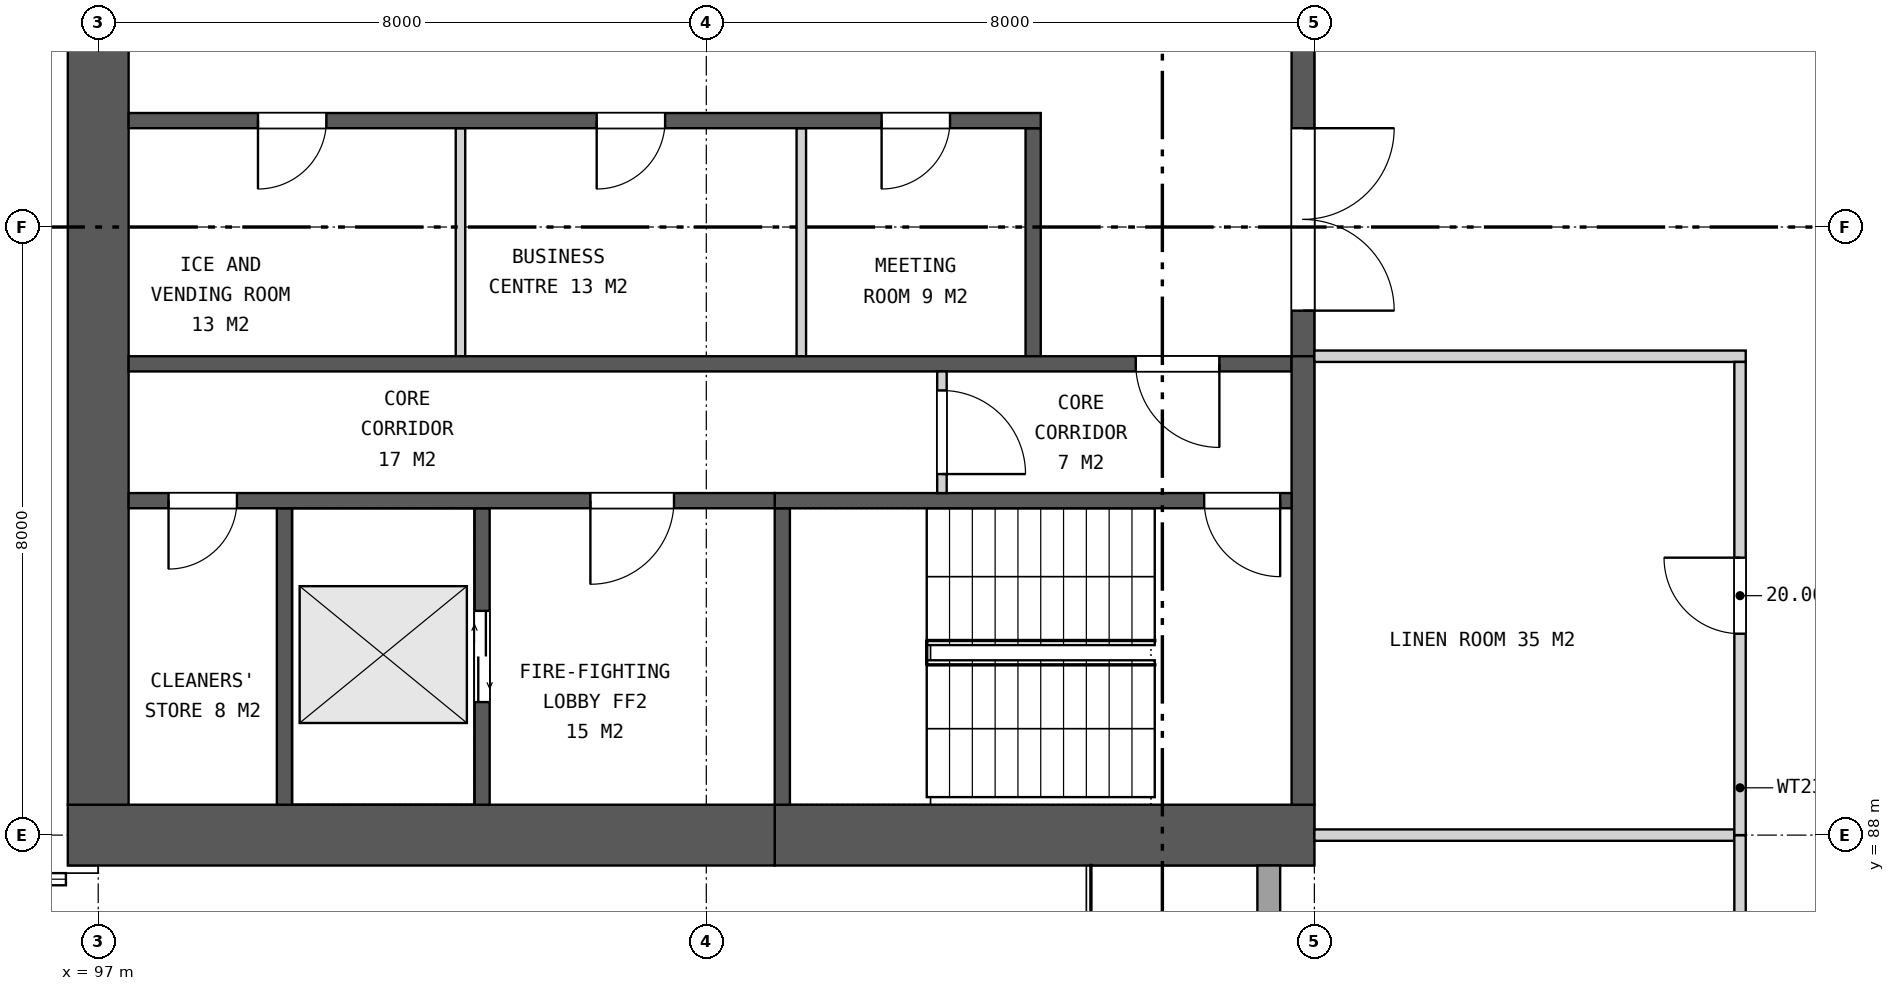
"""IFC4 building model, lengths in metres.
Left out: names, types, materials, properties, quantities, classifications, styles, units other than length and angle.
Written with IfcOpenShell. Run it as: python <this file> out.ifc"""

import sys

from ifc_helpers import new_model, si_unit, direction, frame, frame_2d, origin, place, context, subcontext, project, spatial, rectangle, extrude, element, fill, save


model = new_model("IFC4")
c1 = context("Model", 3, precision=1e-05, world=origin(), true_north=direction((0.0, 1.0)))
c2 = subcontext(c1, "Body", "Model", "MODEL_VIEW")
j1 = project(units=[si_unit("LENGTHUNIT", "METRE"), si_unit("PLANEANGLEUNIT", "RADIAN")], contexts=[c1])
p1 = place(None, origin())
s1 = spatial("IfcSite", under=j1, at=p1, CompositionType="ELEMENT")
p2 = place(p1, origin())
s2 = spatial("IfcBuilding", under=s1, at=p2, CompositionType="ELEMENT")
p3 = place(p2, frame((0.0, 0.0, 101.6)))
s3 = spatial("IfcBuildingStorey", under=s2, at=p3, CompositionType="ELEMENT", Elevation=101.6)
p4 = place(p3, frame((113.0, 88.0, 0.0), z_axis=(0.0, 0.0, 1.0), x_axis=(-1.0, 0.0, 0.0)))
e1 = element("IfcWall", 1, at=p4, inside=s3, PredefinedType="SHEAR", context=c2, shape_type="SweptSolid", body=[
    extrude(rectangle(XDim=7.1, YDim=0.8, at=frame_2d((3.55, 0.0))), origin(), (0.0, 0.0, 1.0), 3.7),
])
p5 = place(p3, frame((105.9, 88.0, 0.0), z_axis=(0.0, 0.0, 1.0), x_axis=(-1.0, 0.0, 0.0)))
e2 = element("IfcWall", 2, at=p5, inside=s3, PredefinedType="SHEAR", context=c2, shape_type="SweptSolid", body=[
    extrude(rectangle(XDim=9.3, YDim=0.8, at=frame_2d((4.65, 0.0))), origin(), (0.0, 0.0, 1.0), 3.7),
])
p6 = place(p3, frame((97.0, 111.6, 0.0), z_axis=(0.0, 0.0, 1.0), x_axis=(0.0, -1.0, 0.0)))
e3 = element("IfcWall", 3, at=p6, inside=s3, PredefinedType="SHEAR", context=c2, shape_type="SweptSolid", body=[
    extrude(rectangle(XDim=23.2, YDim=0.8, at=frame_2d((11.6, 0.0))), origin(), (0.0, 0.0, 1.0), 3.7),
])
p7 = place(p6, frame((10.4, 0.0, 0.0)))
e4 = element("IfcOpeningElement", 4, at=p7, cuts=e3, PredefinedType="OPENING", context=c2, shape_type="SweptSolid", body=[
    extrude(rectangle(XDim=2.4, YDim=2.4, at=frame_2d((1.2, 1.2))), frame((0.0, 0.41, 0.0), z_axis=(0.0, -1.0, 0.0), x_axis=(1.0, 0.0, 0.0)), (0.0, 0.0, 1.0), 0.82),
])
p8 = place(p3, frame((112.85, 105.7, 0.0), z_axis=(0.0, 0.0, 1.0), x_axis=(0.0, -1.0, 0.0)))
e5 = element("IfcWall", 5, at=p8, inside=s3, PredefinedType="SHEAR", context=c2, shape_type="SweptSolid", body=[
    extrude(rectangle(XDim=11.4, YDim=0.3, at=frame_2d((5.7, 0.0))), origin(), (0.0, 0.0, 1.0), 3.7),
])
p9 = place(p8, frame((0.6, 0.0, 0.0)))
e6 = element("IfcOpeningElement", 6, at=p9, cuts=e5, PredefinedType="OPENING", context=c2, shape_type="SweptSolid", body=[
    extrude(rectangle(XDim=2.4, YDim=2.4, at=frame_2d((1.2, 1.2))), frame((0.0, 0.16, 0.0), z_axis=(0.0, -1.0, 0.0), x_axis=(1.0, 0.0, 0.0)), (0.0, 0.0, 1.0), 0.32),
])
p10 = place(p8, frame((4.5, 0.0, 0.0)))
e7 = element("IfcOpeningElement", 7, at=p10, cuts=e5, PredefinedType="OPENING", context=c2, shape_type="SweptSolid", body=[
    extrude(rectangle(XDim=2.4, YDim=2.4, at=frame_2d((1.2, 1.2))), frame((0.0, 0.16, 0.0), z_axis=(0.0, -1.0, 0.0), x_axis=(1.0, 0.0, 0.0)), (0.0, 0.0, 1.0), 0.32),
])
p11 = place(p8, frame((8.4, 0.0, 0.0)))
e8 = element("IfcOpeningElement", 8, at=p11, cuts=e5, PredefinedType="OPENING", context=c2, shape_type="SweptSolid", body=[
    extrude(rectangle(XDim=2.4, YDim=2.4, at=frame_2d((1.2, 1.2))), frame((0.0, 0.16, 0.0), z_axis=(0.0, -1.0, 0.0), x_axis=(1.0, 0.0, 0.0)), (0.0, 0.0, 1.0), 0.32),
])
p12 = place(p3, frame((109.3, 97.3, 0.0), z_axis=(0.0, 0.0, 1.0), x_axis=(0.0, -1.0, 0.0)))
e9 = element("IfcWall", 9, at=p12, inside=s3, PredefinedType="SHEAR", context=c2, shape_type="SweptSolid", body=[
    extrude(rectangle(XDim=3.0, YDim=0.2, at=frame_2d((1.5, 0.0))), origin(), (0.0, 0.0, 1.0), 3.7),
])
for number, where, z_axis, x_axis in (
    (10, (106.25, 97.3, 0.0), (0.0, 0.0, 1.0), (0.0, -1.0, 0.0)),
    (11, (101.766, 97.3, 0.0), (0.0, 0.0, 1.0), (0.0, -1.0, 0.0)),
):
    element("IfcWall", number, at=place(p3, frame(where, z_axis=z_axis, x_axis=x_axis)), inside=s3, PredefinedType="PARTITIONING", context=c2, shape_type="SweptSolid", body=[
        extrude(rectangle(XDim=3.0, YDim=0.125, at=frame_2d((1.5, 0.0))), origin(), (0.0, 0.0, 1.0), 3.7),
    ])
p13 = place(p3, frame((109.4, 97.4, 0.0), z_axis=(0.0, 0.0, 1.0), x_axis=(-1.0, 0.0, 0.0)))
e12 = element("IfcWall", 12, at=p13, inside=s3, PredefinedType="SHEAR", context=c2, shape_type="SweptSolid", body=[
    extrude(rectangle(XDim=12.0, YDim=0.2, at=frame_2d((6.0, 0.0))), origin(), (0.0, 0.0, 1.0), 3.7),
])
p14 = place(p13, frame((1.194, 0.0, 0.0)))
e13 = element("IfcOpeningElement", 13, at=p14, cuts=e12, PredefinedType="OPENING", context=c2, shape_type="SweptSolid", body=[
    extrude(rectangle(XDim=0.9, YDim=2.1, at=frame_2d((0.45, 1.05))), frame((0.0, 0.11, 0.0), z_axis=(0.0, -1.0, 0.0), x_axis=(1.0, 0.0, 0.0)), (0.0, 0.0, 1.0), 0.22),
])
p15 = place(p13, frame((4.942, 0.0, 0.0)))
e14 = element("IfcOpeningElement", 14, at=p15, cuts=e12, PredefinedType="OPENING", context=c2, shape_type="SweptSolid", body=[
    extrude(rectangle(XDim=0.9, YDim=2.1, at=frame_2d((0.45, 1.05))), frame((0.0, 0.11, 0.0), z_axis=(0.0, -1.0, 0.0), x_axis=(1.0, 0.0, 0.0)), (0.0, 0.0, 1.0), 0.22),
])
p16 = place(p13, frame((9.398, 0.0, 0.0)))
e15 = element("IfcOpeningElement", 15, at=p16, cuts=e12, PredefinedType="OPENING", context=c2, shape_type="SweptSolid", body=[
    extrude(rectangle(XDim=0.9, YDim=2.1, at=frame_2d((0.45, 1.05))), frame((0.0, 0.11, 0.0), z_axis=(0.0, -1.0, 0.0), x_axis=(1.0, 0.0, 0.0)), (0.0, 0.0, 1.0), 0.22),
])
p17 = place(p3, frame((112.7, 94.2, 0.0), z_axis=(0.0, 0.0, 1.0), x_axis=(-1.0, 0.0, 0.0)))
e16 = element("IfcWall", 16, at=p17, inside=s3, PredefinedType="SHEAR", context=c2, shape_type="SweptSolid", body=[
    extrude(rectangle(XDim=15.3, YDim=0.2, at=frame_2d((7.65, 0.0))), origin(), (0.0, 0.0, 1.0), 3.7),
])
p18 = place(p17, frame((0.95, 0.0, 0.0)))
e17 = element("IfcOpeningElement", 17, at=p18, cuts=e16, PredefinedType="OPENING", context=c2, shape_type="SweptSolid", body=[
    extrude(rectangle(XDim=1.1, YDim=2.1, at=frame_2d((0.55, 1.05))), frame((0.0, 0.11, 0.0), z_axis=(0.0, -1.0, 0.0), x_axis=(1.0, 0.0, 0.0)), (0.0, 0.0, 1.0), 0.22),
])
p19 = place(p3, frame((112.85, 94.3, 0.0), z_axis=(0.0, 0.0, 1.0), x_axis=(0.0, -1.0, 0.0)))
e18 = element("IfcWall", 18, at=p19, inside=s3, PredefinedType="SHEAR", context=c2, shape_type="SweptSolid", body=[
    extrude(rectangle(XDim=5.9, YDim=0.3, at=frame_2d((2.95, 0.0))), origin(), (0.0, 0.0, 1.0), 3.7),
])
p20 = place(p3, frame((106.0, 92.3, 0.0), z_axis=(0.0, 0.0, 1.0), x_axis=(0.0, -1.0, 0.0)))
e19 = element("IfcWall", 19, at=p20, inside=s3, PredefinedType="SHEAR", context=c2, shape_type="SweptSolid", body=[
    extrude(rectangle(XDim=3.9, YDim=0.2, at=frame_2d((1.95, 0.0))), origin(), (0.0, 0.0, 1.0), 3.7),
])
p21 = place(p3, frame((102.05, 92.3, 0.0), z_axis=(0.0, 0.0, 1.0), x_axis=(0.0, -1.0, 0.0)))
e20 = element("IfcWall", 20, at=p21, inside=s3, PredefinedType="SHEAR", context=c2, shape_type="SweptSolid", body=[
    extrude(rectangle(XDim=3.9, YDim=0.2, at=frame_2d((1.95, 0.0))), origin(), (0.0, 0.0, 1.0), 3.7),
])
p22 = place(p21, frame((1.35, 0.0, 0.0)))
e21 = element("IfcOpeningElement", 21, at=p22, cuts=e20, PredefinedType="OPENING", context=c2, shape_type="SweptSolid", body=[
    extrude(rectangle(XDim=1.2, YDim=2.1, at=frame_2d((0.6, 1.05))), frame((0.0, 0.11, 0.0), z_axis=(0.0, -1.0, 0.0), x_axis=(1.0, 0.0, 0.0)), (0.0, 0.0, 1.0), 0.22),
])
p23 = place(p3, frame((99.45, 92.3, 0.0), z_axis=(0.0, 0.0, 1.0), x_axis=(0.0, -1.0, 0.0)))
e22 = element("IfcWall", 22, at=p23, inside=s3, PredefinedType="SHEAR", context=c2, shape_type="SweptSolid", body=[
    extrude(rectangle(XDim=3.9, YDim=0.2, at=frame_2d((1.95, 0.0))), origin(), (0.0, 0.0, 1.0), 3.7),
])
p24 = place(p3, frame((112.7, 92.4, 0.0), z_axis=(0.0, 0.0, 1.0), x_axis=(-1.0, 0.0, 0.0)))
e23 = element("IfcWall", 23, at=p24, inside=s3, PredefinedType="SHEAR", context=c2, shape_type="SweptSolid", body=[
    extrude(rectangle(XDim=6.8, YDim=0.2, at=frame_2d((3.4, 0.0))), origin(), (0.0, 0.0, 1.0), 3.7),
])
p25 = place(p24, frame((0.15, 0.0, 0.0)))
e24 = element("IfcOpeningElement", 24, at=p25, cuts=e23, PredefinedType="OPENING", context=c2, shape_type="SweptSolid", body=[
    extrude(rectangle(XDim=1.0, YDim=2.1, at=frame_2d((0.5, 1.05))), frame((0.0, 0.11, 0.0), z_axis=(0.0, -1.0, 0.0), x_axis=(1.0, 0.0, 0.0)), (0.0, 0.0, 1.0), 0.22),
])
p26 = place(p3, frame((105.9, 92.4, 0.0), z_axis=(0.0, 0.0, 1.0), x_axis=(-1.0, 0.0, 0.0)))
e25 = element("IfcWall", 25, at=p26, inside=s3, PredefinedType="SHEAR", context=c2, shape_type="SweptSolid", body=[
    extrude(rectangle(XDim=8.5, YDim=0.2, at=frame_2d((4.25, 0.0))), origin(), (0.0, 0.0, 1.0), 3.7),
])
p27 = place(p26, frame((1.325, 0.0, 0.0)))
e26 = element("IfcOpeningElement", 26, at=p27, cuts=e25, PredefinedType="OPENING", context=c2, shape_type="SweptSolid", body=[
    extrude(rectangle(XDim=1.1, YDim=2.1, at=frame_2d((0.55, 1.05))), frame((0.0, 0.11, 0.0), z_axis=(0.0, -1.0, 0.0), x_axis=(1.0, 0.0, 0.0)), (0.0, 0.0, 1.0), 0.22),
])
p28 = place(p26, frame((7.075, 0.0, 0.0)))
e27 = element("IfcOpeningElement", 27, at=p28, cuts=e25, PredefinedType="OPENING", context=c2, shape_type="SweptSolid", body=[
    extrude(rectangle(XDim=0.9, YDim=2.1, at=frame_2d((0.45, 1.05))), frame((0.0, 0.11, 0.0), z_axis=(0.0, -1.0, 0.0), x_axis=(1.0, 0.0, 0.0)), (0.0, 0.0, 1.0), 0.22),
])
p29 = place(p3, frame((108.1, 94.1, 0.0), z_axis=(0.0, 0.0, 1.0), x_axis=(0.0, -1.0, 0.0)))
e28 = element("IfcWall", 28, at=p29, inside=s3, PredefinedType="PARTITIONING", context=c2, shape_type="SweptSolid", body=[
    extrude(rectangle(XDim=1.6, YDim=0.125, at=frame_2d((0.8, 0.0))), origin(), (0.0, 0.0, 1.0), 3.7),
])
p30 = place(p29, frame((0.25, 0.0, 0.0)))
e29 = element("IfcOpeningElement", 29, at=p30, cuts=e28, PredefinedType="OPENING", context=c2, shape_type="SweptSolid", body=[
    extrude(rectangle(XDim=1.1, YDim=2.1, at=frame_2d((0.55, 1.05))), frame((0.0, 0.073, 0.0), z_axis=(0.0, -1.0, 0.0), x_axis=(1.0, 0.0, 0.0)), (0.0, 0.0, 1.0), 0.145),
])
p31 = place(p3, frame((112.4, 87.6, 0.0), z_axis=(0.0, 0.0, 1.0), x_axis=(0.0, -1.0, 0.0)))
e30 = element("IfcWall", 30, at=p31, inside=s3, PredefinedType="SOLIDWALL", context=c2, shape_type="SweptSolid", body=[
    extrude(rectangle(XDim=7.568, YDim=0.3, at=frame_2d((3.784, 0.0))), origin(), (0.0, 0.0, 1.0), 3.3),
])
p32 = place(p31, frame((2.55, 0.0, 0.0)))
e31 = element("IfcOpeningElement", 31, at=p32, cuts=e30, PredefinedType="OPENING", context=c2, shape_type="SweptSolid", body=[
    extrude(rectangle(XDim=2.1, YDim=2.4, at=frame_2d((1.05, 1.2))), frame((0.0, 0.16, 0.0), z_axis=(0.0, -1.0, 0.0), x_axis=(1.0, 0.0, 0.0)), (0.0, 0.0, 1.0), 0.32),
])
p33 = place(p3, frame((113.0, 88.0, 0.0), z_axis=(0.0, 0.0, 1.0), x_axis=(1.0, 0.0, 0.0)))
e32 = element("IfcWall", 32, at=p33, inside=s3, PredefinedType="PARTITIONING", context=c2, shape_type="SweptSolid", body=[
    extrude(rectangle(XDim=5.525, YDim=0.15, at=frame_2d((2.762, 0.0))), origin(), (0.0, 0.0, 1.0), 3.7),
])
p34 = place(p3, frame((113.0, 94.3, 0.0), z_axis=(0.0, 0.0, 1.0), x_axis=(1.0, 0.0, 0.0)))
e33 = element("IfcWall", 33, at=p34, inside=s3, PredefinedType="PARTITIONING", context=c2, shape_type="SweptSolid", body=[
    extrude(rectangle(XDim=5.675, YDim=0.15, at=frame_2d((2.837, 0.0))), origin(), (0.0, 0.0, 1.0), 3.7),
])
p35 = place(p3, frame((118.6, 63.5, 0.0), z_axis=(0.0, 0.0, 1.0), x_axis=(0.0, 1.0, 0.0)))
e34 = element("IfcWall", 34, at=p35, inside=s3, PredefinedType="PARTITIONING", context=c2, shape_type="SweptSolid", body=[
    extrude(rectangle(XDim=24.5, YDim=0.15, at=frame_2d((12.25, 0.0))), origin(), (0.0, 0.0, 1.0), 2.76),
])
p36 = place(p35, frame((19.4, 0.0, 0.0)))
e35 = element("IfcOpeningElement", 35, at=p36, cuts=e34, PredefinedType="OPENING", context=c2, shape_type="SweptSolid", body=[
    extrude(rectangle(XDim=1.2, YDim=2.2, at=frame_2d((0.6, 1.1))), frame((0.0, 0.085, 0.0), z_axis=(0.0, -1.0, 0.0), x_axis=(1.0, 0.0, 0.0)), (0.0, 0.0, 1.0), 0.17),
])
p37 = place(p35, frame((6.4, 0.0, 0.0)))
e36 = element("IfcOpeningElement", 36, at=p37, cuts=e34, PredefinedType="OPENING", context=c2, shape_type="SweptSolid", body=[
    extrude(rectangle(XDim=1.2, YDim=2.2, at=frame_2d((0.6, 1.1))), frame((0.0, 0.085, 0.0), z_axis=(0.0, -1.0, 0.0), x_axis=(1.0, 0.0, 0.0)), (0.0, 0.0, 1.0), 0.17),
])
p38 = place(p35, frame((3.2, 0.0, 0.0)))
e37 = element("IfcOpeningElement", 37, at=p38, cuts=e34, PredefinedType="OPENING", context=c2, shape_type="SweptSolid", body=[
    extrude(rectangle(XDim=1.0, YDim=2.1, at=frame_2d((0.5, 1.05))), frame((0.0, 0.085, 0.0), z_axis=(0.0, -1.0, 0.0), x_axis=(1.0, 0.0, 0.0)), (0.0, 0.0, 1.0), 0.17),
])
p39 = place(p3, frame((118.6, 88.0, 0.0), z_axis=(0.0, 0.0, 1.0), x_axis=(0.0, 1.0, 0.0)))
e38 = element("IfcWall", 38, at=p39, inside=s3, PredefinedType="PARTITIONING", context=c2, shape_type="SweptSolid", body=[
    extrude(rectangle(XDim=6.225, YDim=0.15, at=frame_2d((3.113, 0.0))), origin(), (0.0, 0.0, 1.0), 2.843),
])
p40 = place(p39, frame((2.65, 0.0, 0.0)))
e39 = element("IfcOpeningElement", 39, at=p40, cuts=e38, PredefinedType="OPENING", context=c2, shape_type="SweptSolid", body=[
    extrude(rectangle(XDim=1.0, YDim=2.1, at=frame_2d((0.5, 1.05))), frame((0.0, 0.085, 0.0), z_axis=(0.0, -1.0, 0.0), x_axis=(1.0, 0.0, 0.0)), (0.0, 0.0, 1.0), 0.17),
])
p41 = place(p11, origin())
e40 = element("IfcDoor", 40, at=p41, inside=s3, OperationType="DOUBLE_DOOR_SINGLE_SWING", PredefinedType="DOOR", context=c2, shape_type="SweptSolid", body=[
    extrude(rectangle(XDim=2.4, YDim=2.4, at=frame_2d((1.2, 1.2))), frame((0.0, 0.025, 0.0), z_axis=(0.0, -1.0, 0.0), x_axis=(1.0, 0.0, 0.0)), (0.0, 0.0, 1.0), 0.05),
])
fill(e8, e40)
p42 = place(p14, origin())
e41 = element("IfcDoor", 41, at=p42, inside=s3, OperationType="SINGLE_SWING_RIGHT", PredefinedType="DOOR", context=c2, shape_type="SweptSolid", body=[
    extrude(rectangle(XDim=0.9, YDim=2.1, at=frame_2d((0.45, 1.05))), frame((0.0, 0.025, 0.0), z_axis=(0.0, -1.0, 0.0), x_axis=(1.0, 0.0, 0.0)), (0.0, 0.0, 1.0), 0.05),
])
fill(e13, e41)
p43 = place(p15, origin())
e42 = element("IfcDoor", 42, at=p43, inside=s3, OperationType="SINGLE_SWING_RIGHT", PredefinedType="DOOR", context=c2, shape_type="SweptSolid", body=[
    extrude(rectangle(XDim=0.9, YDim=2.1, at=frame_2d((0.45, 1.05))), frame((0.0, 0.025, 0.0), z_axis=(0.0, -1.0, 0.0), x_axis=(1.0, 0.0, 0.0)), (0.0, 0.0, 1.0), 0.05),
])
fill(e14, e42)
p44 = place(p16, origin())
e43 = element("IfcDoor", 43, at=p44, inside=s3, OperationType="SINGLE_SWING_RIGHT", PredefinedType="DOOR", context=c2, shape_type="SweptSolid", body=[
    extrude(rectangle(XDim=0.9, YDim=2.1, at=frame_2d((0.45, 1.05))), frame((0.0, 0.025, 0.0), z_axis=(0.0, -1.0, 0.0), x_axis=(1.0, 0.0, 0.0)), (0.0, 0.0, 1.0), 0.05),
])
fill(e15, e43)
p45 = place(p18, origin())
e44 = element("IfcDoor", 44, at=p45, inside=s3, OperationType="SINGLE_SWING_LEFT", PredefinedType="DOOR", context=c2, shape_type="SweptSolid", body=[
    extrude(rectangle(XDim=1.1, YDim=2.1, at=frame_2d((0.55, 1.05))), frame((0.0, 0.025, 0.0), z_axis=(0.0, -1.0, 0.0), x_axis=(1.0, 0.0, 0.0)), (0.0, 0.0, 1.0), 0.05),
])
fill(e17, e44)
p46 = place(p22, origin())
e45 = element("IfcDoor", 45, at=p46, inside=s3, OperationType="DOUBLE_DOOR_SLIDING", PredefinedType="DOOR", context=c2, shape_type="SweptSolid", body=[
    extrude(rectangle(XDim=1.2, YDim=2.1, at=frame_2d((0.6, 1.05))), frame((0.0, 0.025, 0.0), z_axis=(0.0, -1.0, 0.0), x_axis=(1.0, 0.0, 0.0)), (0.0, 0.0, 1.0), 0.05),
])
fill(e21, e45)
p47 = place(p25, origin())
e46 = element("IfcDoor", 46, at=p47, inside=s3, OperationType="SINGLE_SWING_LEFT", PredefinedType="DOOR", context=c2, shape_type="SweptSolid", body=[
    extrude(rectangle(XDim=1.0, YDim=2.1, at=frame_2d((0.5, 1.05))), frame((0.0, 0.025, 0.0), z_axis=(0.0, -1.0, 0.0), x_axis=(1.0, 0.0, 0.0)), (0.0, 0.0, 1.0), 0.05),
])
fill(e24, e46)
p48 = place(p27, origin())
e47 = element("IfcDoor", 47, at=p48, inside=s3, OperationType="SINGLE_SWING_RIGHT", PredefinedType="DOOR", context=c2, shape_type="SweptSolid", body=[
    extrude(rectangle(XDim=1.1, YDim=2.1, at=frame_2d((0.55, 1.05))), frame((0.0, 0.025, 0.0), z_axis=(0.0, -1.0, 0.0), x_axis=(1.0, 0.0, 0.0)), (0.0, 0.0, 1.0), 0.05),
])
fill(e26, e47)
p49 = place(p28, origin())
e48 = element("IfcDoor", 48, at=p49, inside=s3, OperationType="SINGLE_SWING_RIGHT", PredefinedType="DOOR", context=c2, shape_type="SweptSolid", body=[
    extrude(rectangle(XDim=0.9, YDim=2.1, at=frame_2d((0.45, 1.05))), frame((0.0, 0.025, 0.0), z_axis=(0.0, -1.0, 0.0), x_axis=(1.0, 0.0, 0.0)), (0.0, 0.0, 1.0), 0.05),
])
fill(e27, e48)
p50 = place(p30, origin())
e49 = element("IfcDoor", 49, at=p50, inside=s3, OperationType="SINGLE_SWING_RIGHT", PredefinedType="DOOR", context=c2, shape_type="SweptSolid", body=[
    extrude(rectangle(XDim=1.1, YDim=2.1, at=frame_2d((0.55, 1.05))), frame((0.0, 0.025, 0.0), z_axis=(0.0, -1.0, 0.0), x_axis=(1.0, 0.0, 0.0)), (0.0, 0.0, 1.0), 0.05),
])
fill(e29, e49)
p51 = place(p40, origin())
e50 = element("IfcDoor", 50, at=p51, inside=s3, OperationType="SINGLE_SWING_RIGHT", PredefinedType="DOOR", context=c2, shape_type="SweptSolid", body=[
    extrude(rectangle(XDim=1.0, YDim=2.1, at=frame_2d((0.5, 1.05))), frame((0.0, 0.025, 0.0), z_axis=(0.0, -1.0, 0.0), x_axis=(1.0, 0.0, 0.0)), (0.0, 0.0, 1.0), 0.05),
])
fill(e39, e50)
save(model, sys.argv[1])
